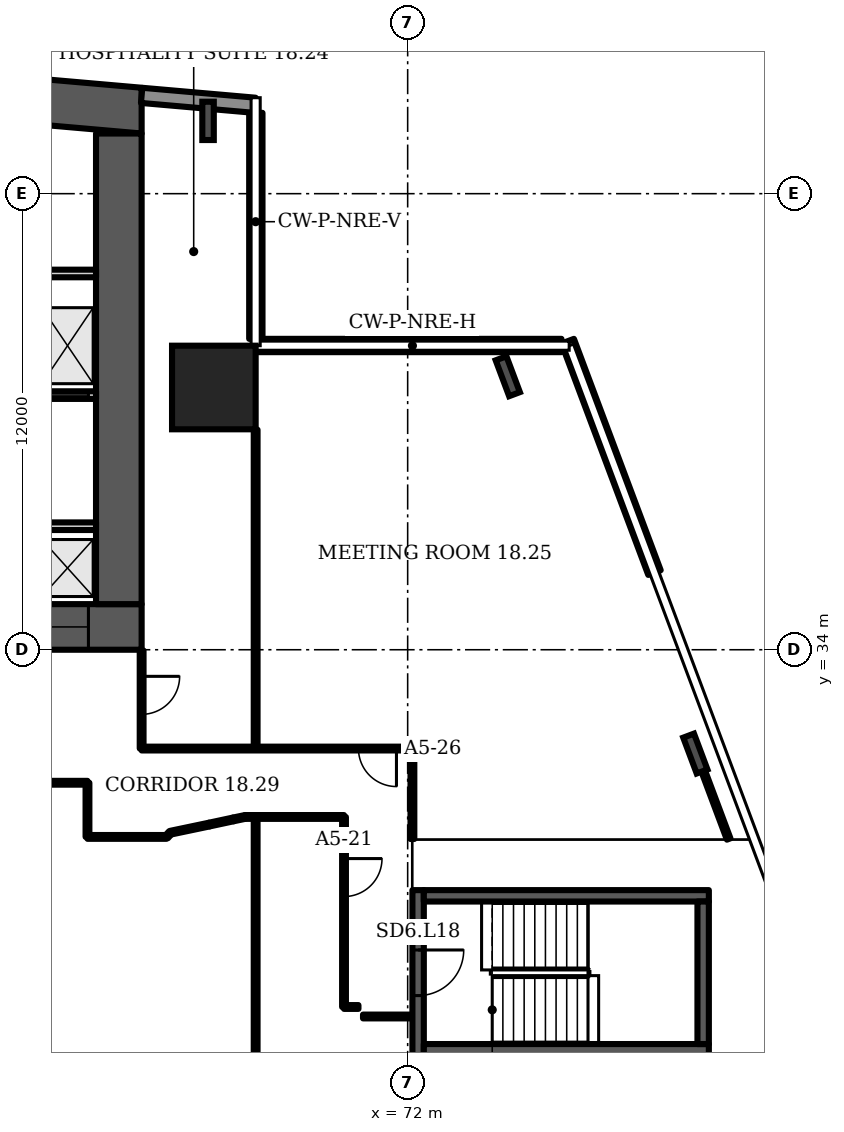
"""IFC4 building model, lengths in metres.
Left out: names, types, materials, properties, quantities, classifications, styles, units other than length and angle.
Written with IfcOpenShell. Run it as: python <this file> out.ifc"""

import sys

from ifc_helpers import new_model, si_unit, direction, frame, frame_2d, origin, origin_2d, place, context, subcontext, project, spatial, polyline, rectangle, i_section, outline, extrude, element, fill, save


model = new_model("IFC4")
c1 = context("Model", 3, precision=1e-05, world=origin(), true_north=direction((0.0, 1.0)))
c2 = subcontext(c1, "Body", "Model", "MODEL_VIEW")
j1 = project(units=[si_unit("LENGTHUNIT", "METRE"), si_unit("PLANEANGLEUNIT", "RADIAN")], contexts=[c1])
p1 = place(None, origin())
s1 = spatial("IfcSite", under=j1, at=p1, CompositionType="ELEMENT")
p2 = place(p1, origin())
s2 = spatial("IfcBuilding", under=s1, at=p2, CompositionType="ELEMENT")
p3 = place(p2, frame((0.0, 0.0, 84.7)))
s3 = spatial("IfcBuildingStorey", under=s2, at=p3, CompositionType="ELEMENT", Elevation=84.7)
p4 = place(p3, origin())
e1 = element("IfcWall", 1, at=p4, inside=s3, PredefinedType="SHEAR", context=c2, shape_type="SweptSolid", body=[
    extrude(outline(polyline([(9.0, 47.583), (37.0, 50.032), (65.0, 47.583), (65.0, 48.787), (37.0, 51.237), (9.0, 48.787), (9.0, 47.583)])), origin(), (0.0, 0.0, 1.0), 3.6),
])
p5 = place(p3, frame((9.0, 34.6, 0.0), z_axis=(0.0, 0.0, 1.0), x_axis=(1.0, 0.0, 0.0)))
e2 = element("IfcWall", 2, at=p5, inside=s3, PredefinedType="SHEAR", context=c2, shape_type="SweptSolid", body=[
    extrude(rectangle(XDim=56.0, YDim=1.2, at=frame_2d((28.0, 0.0))), origin(), (0.0, 0.0, 1.0), 3.6),
])
p6 = place(p5, frame((3.3, 0.0, 0.0)))
e3 = element("IfcOpeningElement", 3, at=p6, cuts=e2, PredefinedType="OPENING", context=c2, shape_type="SweptSolid", body=[
    extrude(rectangle(XDim=1.0, YDim=2.1, at=frame_2d((0.5, 1.05))), frame((0.0, 0.61, 0.0), z_axis=(0.0, -1.0, 0.0), x_axis=(1.0, 0.0, 0.0)), (0.0, 0.0, 1.0), 1.22),
])
p7 = place(p5, frame((7.867, 0.0, 0.0)))
e4 = element("IfcOpeningElement", 4, at=p7, cuts=e2, PredefinedType="OPENING", context=c2, shape_type="SweptSolid", body=[
    extrude(rectangle(XDim=1.1, YDim=2.1, at=frame_2d((0.55, 1.05))), frame((0.0, 0.61, 0.0), z_axis=(0.0, -1.0, 0.0), x_axis=(1.0, 0.0, 0.0)), (0.0, 0.0, 1.0), 1.22),
])
p8 = place(p5, frame((12.033, 0.0, 0.0)))
e5 = element("IfcOpeningElement", 5, at=p8, cuts=e2, PredefinedType="OPENING", context=c2, shape_type="SweptSolid", body=[
    extrude(rectangle(XDim=1.1, YDim=2.1, at=frame_2d((0.55, 1.05))), frame((0.0, 0.61, 0.0), z_axis=(0.0, -1.0, 0.0), x_axis=(1.0, 0.0, 0.0)), (0.0, 0.0, 1.0), 1.22),
])
p9 = place(p5, frame((9.8, 0.0, 0.0)))
e6 = element("IfcOpeningElement", 6, at=p9, cuts=e2, PredefinedType="OPENING", context=c2, shape_type="SweptSolid", body=[
    extrude(rectangle(XDim=1.4, YDim=2.1, at=frame_2d((0.7, 1.05))), frame((0.0, 0.61, 0.0), z_axis=(0.0, -1.0, 0.0), x_axis=(1.0, 0.0, 0.0)), (0.0, 0.0, 1.0), 1.22),
])
p10 = place(p5, frame((14.65, 0.0, 0.0)))
e7 = element("IfcOpeningElement", 7, at=p10, cuts=e2, PredefinedType="OPENING", context=c2, shape_type="SweptSolid", body=[
    extrude(rectangle(XDim=1.2, YDim=2.1, at=frame_2d((0.6, 1.05))), frame((0.0, 0.61, 0.0), z_axis=(0.0, -1.0, 0.0), x_axis=(1.0, 0.0, 0.0)), (0.0, 0.0, 1.0), 1.22),
])
p11 = place(p5, frame((21.867, 0.0, 0.0)))
e8 = element("IfcOpeningElement", 8, at=p11, cuts=e2, PredefinedType="OPENING", context=c2, shape_type="SweptSolid", body=[
    extrude(rectangle(XDim=1.1, YDim=2.1, at=frame_2d((0.55, 1.05))), frame((0.0, 0.61, 0.0), z_axis=(0.0, -1.0, 0.0), x_axis=(1.0, 0.0, 0.0)), (0.0, 0.0, 1.0), 1.22),
])
p12 = place(p5, frame((26.033, 0.0, 0.0)))
e9 = element("IfcOpeningElement", 9, at=p12, cuts=e2, PredefinedType="OPENING", context=c2, shape_type="SweptSolid", body=[
    extrude(rectangle(XDim=1.1, YDim=2.1, at=frame_2d((0.55, 1.05))), frame((0.0, 0.61, 0.0), z_axis=(0.0, -1.0, 0.0), x_axis=(1.0, 0.0, 0.0)), (0.0, 0.0, 1.0), 1.22),
])
p13 = place(p5, frame((23.8, 0.0, 0.0)))
e10 = element("IfcOpeningElement", 10, at=p13, cuts=e2, PredefinedType="OPENING", context=c2, shape_type="SweptSolid", body=[
    extrude(rectangle(XDim=1.4, YDim=2.1, at=frame_2d((0.7, 1.05))), frame((0.0, 0.61, 0.0), z_axis=(0.0, -1.0, 0.0), x_axis=(1.0, 0.0, 0.0)), (0.0, 0.0, 1.0), 1.22),
])
p14 = place(p5, frame((28.867, 0.0, 0.0)))
e11 = element("IfcOpeningElement", 11, at=p14, cuts=e2, PredefinedType="OPENING", context=c2, shape_type="SweptSolid", body=[
    extrude(rectangle(XDim=1.1, YDim=2.1, at=frame_2d((0.55, 1.05))), frame((0.0, 0.61, 0.0), z_axis=(0.0, -1.0, 0.0), x_axis=(1.0, 0.0, 0.0)), (0.0, 0.0, 1.0), 1.22),
])
p15 = place(p5, frame((33.033, 0.0, 0.0)))
e12 = element("IfcOpeningElement", 12, at=p15, cuts=e2, PredefinedType="OPENING", context=c2, shape_type="SweptSolid", body=[
    extrude(rectangle(XDim=1.1, YDim=2.1, at=frame_2d((0.55, 1.05))), frame((0.0, 0.61, 0.0), z_axis=(0.0, -1.0, 0.0), x_axis=(1.0, 0.0, 0.0)), (0.0, 0.0, 1.0), 1.22),
])
p16 = place(p5, frame((40.15, 0.0, 0.0)))
e13 = element("IfcOpeningElement", 13, at=p16, cuts=e2, PredefinedType="OPENING", context=c2, shape_type="SweptSolid", body=[
    extrude(rectangle(XDim=1.2, YDim=2.1, at=frame_2d((0.6, 1.05))), frame((0.0, 0.61, 0.0), z_axis=(0.0, -1.0, 0.0), x_axis=(1.0, 0.0, 0.0)), (0.0, 0.0, 1.0), 1.22),
])
p17 = place(p5, frame((44.8, 0.0, 0.0)))
e14 = element("IfcOpeningElement", 14, at=p17, cuts=e2, PredefinedType="OPENING", context=c2, shape_type="SweptSolid", body=[
    extrude(rectangle(XDim=1.4, YDim=2.1, at=frame_2d((0.7, 1.05))), frame((0.0, 0.61, 0.0), z_axis=(0.0, -1.0, 0.0), x_axis=(1.0, 0.0, 0.0)), (0.0, 0.0, 1.0), 1.22),
])
p18 = place(p5, frame((49.867, 0.0, 0.0)))
e15 = element("IfcOpeningElement", 15, at=p18, cuts=e2, PredefinedType="OPENING", context=c2, shape_type="SweptSolid", body=[
    extrude(rectangle(XDim=1.1, YDim=2.1, at=frame_2d((0.55, 1.05))), frame((0.0, 0.61, 0.0), z_axis=(0.0, -1.0, 0.0), x_axis=(1.0, 0.0, 0.0)), (0.0, 0.0, 1.0), 1.22),
])
p19 = place(p5, frame((53.5, 0.0, 0.0)))
e16 = element("IfcOpeningElement", 16, at=p19, cuts=e2, PredefinedType="OPENING", context=c2, shape_type="SweptSolid", body=[
    extrude(rectangle(XDim=1.1, YDim=2.1, at=frame_2d((0.55, 1.05))), frame((0.0, 0.61, 0.0), z_axis=(0.0, -1.0, 0.0), x_axis=(1.0, 0.0, 0.0)), (0.0, 0.0, 1.0), 1.22),
])
p20 = place(p5, frame((51.567, 0.0, 0.0)))
e17 = element("IfcOpeningElement", 17, at=p20, cuts=e2, PredefinedType="OPENING", context=c2, shape_type="SweptSolid", body=[
    extrude(rectangle(XDim=1.4, YDim=2.1, at=frame_2d((0.7, 1.05))), frame((0.0, 0.61, 0.0), z_axis=(0.0, -1.0, 0.0), x_axis=(1.0, 0.0, 0.0)), (0.0, 0.0, 1.0), 1.22),
])
p21 = place(p3, frame((64.4, 35.2, 0.0), z_axis=(0.0, 0.0, 1.0), x_axis=(0.0, 1.0, 0.0)))
e18 = element("IfcWall", 18, at=p21, inside=s3, PredefinedType="SHEAR", context=c2, shape_type="SweptSolid", body=[
    extrude(rectangle(XDim=12.383, YDim=1.2, at=frame_2d((6.191, 0.0))), origin(), (0.0, 0.0, 1.0), 3.6),
])
p22 = place(p3, frame((66.9, 40.9, 0.0), z_axis=(0.0, 0.0, 1.0), x_axis=(1.0, 0.0, 0.0)))
e19 = element("IfcColumn", 19, at=p22, inside=s3, PredefinedType="COLUMN", context=c2, shape_type="SweptSolid", body=[
    extrude(rectangle(XDim=2.2, YDim=2.2, at=origin_2d()), origin(), (0.0, 0.0, 1.0), 3.6),
])
for number, where, z_axis, x_axis in (
    (20, (79.57, 31.268, 0.0), (0.0, 0.0, 1.0), (0.936, 0.351, 0.0)),
    (21, (74.634, 41.196, 0.0), (0.0, 0.0, 1.0), (0.936, 0.351, 0.0)),
    (22, (66.748, 47.915, 0.0), (0.0, 0.0, 1.0), (1.0, 0.0, 0.0)),
):
    element("IfcColumn", number, at=place(p3, frame(where, z_axis=z_axis, x_axis=x_axis)), inside=s3, PredefinedType="COLUMN", context=c2, shape_type="SweptSolid", body=[
        extrude(i_section(OverallWidth=0.302, OverallDepth=1.008, WebThickness=0.021, FlangeThickness=0.04, FilletRadius=0.03, at=origin_2d()), origin(), (0.0, 0.0, 1.0), 3.6),
    ])
p23 = place(p3, frame((67.983, 48.326, 0.0), z_axis=(0.0, 0.0, 1.0), x_axis=(-0.996194, 0.087168, 0.0)))
e23 = element("IfcWall", 23, at=p23, inside=s3, PredefinedType="SOLIDWALL", context=c2, shape_type="SweptSolid", body=[
    extrude(rectangle(XDim=2.994, YDim=0.4, at=frame_2d((1.497, 0.0))), origin(), (0.0, 0.0, 1.0), 3.2),
])
p24 = place(p3, frame((78.494, 36.03, 0.0), z_axis=(0.0, 0.0, 1.0), x_axis=(-0.351108, 0.936338, 0.0)))
e24 = element("IfcWall", 24, at=p24, inside=s3, PredefinedType="SOLIDWALL", context=c2, shape_type="SweptSolid", body=[
    extrude(rectangle(XDim=6.503, YDim=0.35, at=frame_2d((3.251, 0.0))), origin(), (0.0, 0.0, 1.0), 1.0),
])
p25 = place(p3, frame((76.047, 42.005, 0.0), z_axis=(0.0, 0.0, 1.0), x_axis=(-1.0, 0.0, 0.0)))
e25 = element("IfcWall", 25, at=p25, inside=s3, PredefinedType="SOLIDWALL", context=c2, shape_type="SweptSolid", body=[
    extrude(rectangle(XDim=8.047, YDim=0.35, at=frame_2d((4.023, 0.0))), origin(), (0.0, 0.0, 1.0), 1.0),
])
p26 = place(p3, frame((68.005, 42.18, 0.0), z_axis=(0.0, 0.0, 1.0), x_axis=(0.0, 1.0, 0.0)))
e26 = element("IfcWall", 26, at=p26, inside=s3, PredefinedType="SOLIDWALL", context=c2, shape_type="SweptSolid", body=[
    extrude(rectangle(XDim=5.947, YDim=0.35, at=frame_2d((2.973, 0.0))), origin(), (0.0, 0.0, 1.0), 1.0),
])
p27 = place(p3, frame((58.6, 40.7, 0.0), z_axis=(0.0, 0.0, 1.0), x_axis=(1.0, 0.0, 0.0)))
e27 = element("IfcWall", 27, at=p27, inside=s3, PredefinedType="PARTITIONING", context=c2, shape_type="SweptSolid", body=[
    extrude(rectangle(XDim=5.2, YDim=0.2, at=frame_2d((2.6, 0.0))), origin(), (0.0, 0.0, 1.0), 3.2),
])
p28 = place(p27, frame((0.267, 0.0, 0.0)))
e28 = element("IfcOpeningElement", 28, at=p28, cuts=e27, PredefinedType="OPENING", context=c2, shape_type="SweptSolid", body=[
    extrude(rectangle(XDim=1.1, YDim=2.1, at=frame_2d((0.55, 1.05))), frame((0.0, 0.11, 0.0), z_axis=(0.0, -1.0, 0.0), x_axis=(1.0, 0.0, 0.0)), (0.0, 0.0, 1.0), 0.22),
])
p29 = place(p27, frame((2.117, 0.0, 0.0)))
e29 = element("IfcOpeningElement", 29, at=p29, cuts=e27, PredefinedType="OPENING", context=c2, shape_type="SweptSolid", body=[
    extrude(rectangle(XDim=1.1, YDim=2.1, at=frame_2d((0.55, 1.05))), frame((0.0, 0.11, 0.0), z_axis=(0.0, -1.0, 0.0), x_axis=(1.0, 0.0, 0.0)), (0.0, 0.0, 1.0), 0.22),
])
p30 = place(p27, frame((3.9, 0.0, 0.0)))
e30 = element("IfcOpeningElement", 30, at=p30, cuts=e27, PredefinedType="OPENING", context=c2, shape_type="SweptSolid", body=[
    extrude(rectangle(XDim=1.1, YDim=2.1, at=frame_2d((0.55, 1.05))), frame((0.0, 0.11, 0.0), z_axis=(0.0, -1.0, 0.0), x_axis=(1.0, 0.0, 0.0)), (0.0, 0.0, 1.0), 0.22),
])
p31 = place(p3, frame((0.0, 0.0, -0.0)))
e31 = element("IfcWall", 31, at=p31, inside=s3, PredefinedType="PARTITIONING", context=c2, shape_type="SweptSolid", body=[
    extrude(outline(polyline([(62.1, 37.35), (62.3, 37.35), (63.8, 37.35), (63.8, 37.15), (62.3, 37.15), (62.3, 35.2), (62.1, 35.2), (62.1, 37.35)])), origin(), (0.0, 0.0, 1.0), 3.2),
])
p32 = place(p3, frame((0.0, 0.0, -0.0)))
e32 = element("IfcWall", 32, at=p32, inside=s3, PredefinedType="PARTITIONING", context=c2, shape_type="SweptSolid", body=[
    extrude(outline(polyline([(60.433, 40.8), (60.233, 40.8), (60.233, 43.8), (58.6, 43.8), (58.6, 44.0), (63.8, 44.0), (63.8, 43.8), (62.3, 43.8), (62.3, 40.8), (62.1, 40.8), (62.1, 43.8), (60.433, 43.8), (60.433, 40.8)])), origin(), (0.0, 0.0, 1.0), 3.2),
])
p33 = place(p3, frame((72.275, 23.325, 0.0), z_axis=(0.0, 0.0, 1.0), x_axis=(0.0, 1.0, 0.0)))
e33 = element("IfcWall", 33, at=p33, inside=s3, PredefinedType="SHEAR", context=c2, shape_type="SweptSolid", body=[
    extrude(rectangle(XDim=4.35, YDim=0.3, at=frame_2d((2.175, 0.0))), origin(), (0.0, 0.0, 1.0), 3.2),
])
p34 = place(p33, frame((1.575, 0.0, 0.0)))
e34 = element("IfcOpeningElement", 34, at=p34, cuts=e33, PredefinedType="OPENING", context=c2, shape_type="SweptSolid", body=[
    extrude(rectangle(XDim=1.2, YDim=2.1, at=frame_2d((0.6, 1.05))), frame((0.0, 0.16, 0.0), z_axis=(0.0, -1.0, 0.0), x_axis=(1.0, 0.0, 0.0)), (0.0, 0.0, 1.0), 0.32),
])
p35 = place(p3, frame((45.3, 30.5, 0.0), z_axis=(0.0, 0.0, 1.0), x_axis=(1.0, 0.0, 0.0)))
e35 = element("IfcWall", 35, at=p35, inside=s3, PredefinedType="PARTITIONING", context=c2, shape_type="SweptSolid", body=[
    extrude(rectangle(XDim=18.275, YDim=0.1, at=frame_2d((9.137, 0.0))), origin(), (0.0, 0.0, 1.0), 3.2),
])
p36 = place(p3, frame((63.575, 29.075, 0.0), z_axis=(0.0, 0.0, 1.0), x_axis=(0.0, 1.0, 0.0)))
e36 = element("IfcWall", 36, at=p36, inside=s3, PredefinedType="PARTITIONING", context=c2, shape_type="SweptSolid", body=[
    extrude(rectangle(XDim=1.425, YDim=0.1, at=frame_2d((0.712, 0.0))), origin(), (0.0, 0.0, 1.0), 3.2),
])
p37 = place(p3, frame((63.575, 29.075, 0.0), z_axis=(0.0, 0.0, 1.0), x_axis=(1.0, 0.0, 0.0)))
e37 = element("IfcWall", 37, at=p37, inside=s3, PredefinedType="PARTITIONING", context=c2, shape_type="SweptSolid", body=[
    extrude(rectangle(XDim=2.08, YDim=0.1, at=frame_2d((1.04, 0.0))), origin(), (0.0, 0.0, 1.0), 3.2),
])
p38 = place(p3, frame((65.0, 31.4, 0.0), z_axis=(0.0, 0.0, 1.0), x_axis=(0.0, 1.0, 0.0)))
e38 = element("IfcWall", 38, at=p38, inside=s3, PredefinedType="PARTITIONING", context=c2, shape_type="SweptSolid", body=[
    extrude(rectangle(XDim=2.58, YDim=0.1, at=frame_2d((1.29, 0.0))), origin(), (0.0, 0.0, 1.0), 3.2),
])
p39 = place(p38, frame((0.9, 0.0, 0.0)))
e39 = element("IfcOpeningElement", 39, at=p39, cuts=e38, PredefinedType="OPENING", context=c2, shape_type="SweptSolid", body=[
    extrude(rectangle(XDim=1.0, YDim=2.1, at=frame_2d((0.5, 1.05))), frame((0.0, 0.06, 0.0), z_axis=(0.0, -1.0, 0.0), x_axis=(1.0, 0.0, 0.0)), (0.0, 0.0, 1.0), 0.12),
])
p40 = place(p3, frame((65.0, 31.4, 0.0), z_axis=(0.0, 0.0, 1.0), x_axis=(1.0, 0.0, 0.0)))
e40 = element("IfcWall", 40, at=p40, inside=s3, PredefinedType="PARTITIONING", context=c2, shape_type="SweptSolid", body=[
    extrude(rectangle(XDim=7.125, YDim=0.1, at=frame_2d((3.562, 0.0))), origin(), (0.0, 0.0, 1.0), 3.2),
])
p41 = place(p40, frame((5.705, 0.0, 0.0)))
e41 = element("IfcOpeningElement", 41, at=p41, cuts=e40, PredefinedType="OPENING", context=c2, shape_type="SweptSolid", body=[
    extrude(rectangle(XDim=1.0, YDim=2.1, at=frame_2d((0.5, 1.05))), frame((0.0, 0.06, 0.0), z_axis=(0.0, -1.0, 0.0), x_axis=(1.0, 0.0, 0.0)), (0.0, 0.0, 1.0), 0.12),
])
p42 = place(p3, frame((65.655, 29.075, 0.0), z_axis=(0.0, 0.0, 1.0), x_axis=(0.671773, 0.740757, 0.0)))
e42 = element("IfcWall", 42, at=p42, inside=s3, PredefinedType="PARTITIONING", context=c2, shape_type="SweptSolid", body=[
    extrude(rectangle(XDim=0.149, YDim=0.1, at=frame_2d((0.074, 0.0))), origin(), (0.0, 0.0, 1.0), 3.2),
])
p43 = place(p3, frame((65.755, 29.185, 0.0), z_axis=(0.0, 0.0, 1.0), x_axis=(0.978739, 0.205118, 0.0)))
e43 = element("IfcWall", 43, at=p43, inside=s3, PredefinedType="PARTITIONING", context=c2, shape_type="SweptSolid", body=[
    extrude(rectangle(XDim=1.047, YDim=0.1, at=frame_2d((0.524, 0.0))), origin(), (0.0, 0.0, 1.0), 3.2),
])
p44 = place(p3, frame((66.78, 29.4, 0.0), z_axis=(0.0, 0.0, 1.0), x_axis=(0.977792, 0.209581, 0.0)))
e44 = element("IfcWall", 44, at=p44, inside=s3, PredefinedType="PARTITIONING", context=c2, shape_type="SweptSolid", body=[
    extrude(rectangle(XDim=0.644, YDim=0.1, at=frame_2d((0.322, 0.0))), origin(), (0.0, 0.0, 1.0), 3.2),
])
p45 = place(p3, frame((67.41, 29.535, 0.0), z_axis=(0.0, 0.0, 1.0), x_axis=(0.978604, 0.205738, 0.0)))
e45 = element("IfcWall", 45, at=p45, inside=s3, PredefinedType="PARTITIONING", context=c2, shape_type="SweptSolid", body=[
    extrude(rectangle(XDim=0.317, YDim=0.1, at=frame_2d((0.158, 0.0))), origin(), (0.0, 0.0, 1.0), 3.2),
])
p46 = place(p3, frame((67.72, 29.6, 0.0), z_axis=(0.0, 0.0, 1.0), x_axis=(1.0, 0.0, 0.0)))
e46 = element("IfcWall", 46, at=p46, inside=s3, PredefinedType="PARTITIONING", context=c2, shape_type="SweptSolid", body=[
    extrude(rectangle(XDim=2.605, YDim=0.1, at=frame_2d((1.302, 0.0))), origin(), (0.0, 0.0, 1.0), 3.2),
])
p47 = place(p3, frame((68.0, 14.93, 0.0), z_axis=(0.0, 0.0, 1.0), x_axis=(0.0, 1.0, 0.0)))
e47 = element("IfcWall", 47, at=p47, inside=s3, PredefinedType="PARTITIONING", context=c2, shape_type="SweptSolid", body=[
    extrude(rectangle(XDim=14.67, YDim=0.1, at=frame_2d((7.335, 0.0))), origin(), (0.0, 0.0, 1.0), 3.2),
])
p48 = place(p3, frame((68.0, 31.4, 0.0), z_axis=(0.0, 0.0, 1.0), x_axis=(0.0, 1.0, 0.0)))
e48 = element("IfcWall", 48, at=p48, inside=s3, PredefinedType="PARTITIONING", context=c2, shape_type="SweptSolid", body=[
    extrude(rectangle(XDim=8.39, YDim=0.1, at=frame_2d((4.195, 0.0))), origin(), (0.0, 0.0, 1.0), 3.2),
])
p49 = place(p3, frame((70.325, 24.6, 0.0), z_axis=(0.0, 0.0, 1.0), x_axis=(0.0, 1.0, 0.0)))
e49 = element("IfcWall", 49, at=p49, inside=s3, PredefinedType="PARTITIONING", context=c2, shape_type="SweptSolid", body=[
    extrude(rectangle(XDim=5.0, YDim=0.1, at=frame_2d((2.5, 0.0))), origin(), (0.0, 0.0, 1.0), 3.2),
])
p50 = place(p49, frame((2.905, 0.0, 0.0)))
e50 = element("IfcOpeningElement", 50, at=p50, cuts=e49, PredefinedType="OPENING", context=c2, shape_type="SweptSolid", body=[
    extrude(rectangle(XDim=1.0, YDim=2.1, at=frame_2d((0.5, 1.05))), frame((0.0, 0.06, 0.0), z_axis=(0.0, -1.0, 0.0), x_axis=(1.0, 0.0, 0.0)), (0.0, 0.0, 1.0), 0.12),
])
p51 = place(p3, frame((70.325, 24.6, 0.0), z_axis=(0.0, 0.0, 1.0), x_axis=(1.0, 0.0, 0.0)))
e51 = element("IfcWall", 51, at=p51, inside=s3, PredefinedType="PARTITIONING", context=c2, shape_type="SweptSolid", body=[
    extrude(rectangle(XDim=0.38, YDim=0.1, at=frame_2d((0.19, 0.0))), origin(), (0.0, 0.0, 1.0), 3.2),
])
p52 = place(p3, frame((70.825, 24.35, 0.0), z_axis=(0.0, 0.0, 1.0), x_axis=(1.0, 0.0, 0.0)))
e52 = element("IfcWall", 52, at=p52, inside=s3, PredefinedType="PARTITIONING", context=c2, shape_type="SweptSolid", body=[
    extrude(rectangle(XDim=1.28, YDim=0.1, at=frame_2d((0.64, 0.0))), origin(), (0.0, 0.0, 1.0), 3.2),
])
p53 = place(p3, frame((72.125, 29.02, 0.0), z_axis=(0.0, 0.0, 1.0), x_axis=(0.0, 1.0, 0.0)))
e53 = element("IfcWall", 53, at=p53, inside=s3, PredefinedType="PARTITIONING", context=c2, shape_type="SweptSolid", body=[
    extrude(rectangle(XDim=2.38, YDim=0.1, at=frame_2d((1.19, 0.0))), origin(), (0.0, 0.0, 1.0), 3.2),
])
p54 = place(p3, frame((80.446, 29.02, 0.0), z_axis=(0.0, 0.0, 1.0), x_axis=(-0.350707, 0.936481, 0.0)))
e54 = element("IfcWall", 54, at=p54, inside=s3, PredefinedType="PARTITIONING", context=c2, shape_type="SweptSolid", body=[
    extrude(rectangle(XDim=2.901, YDim=0.1, at=frame_2d((1.45, 0.0))), origin(), (0.0, 0.0, 1.0), 2.58),
])
for number, where, z_axis, x_axis in (
    (55, (72.425, 23.475, 0.0), (0.0, 0.0, 1.0), (1.0, 0.0, 0.0)),
    (56, (72.425, 27.525, 0.0), (0.0, 0.0, 1.0), (1.0, 0.0, 0.0)),
):
    element("IfcWall", number, at=place(p3, frame(where, z_axis=z_axis, x_axis=x_axis)), inside=s3, PredefinedType="SHEAR", context=c2, shape_type="SweptSolid", body=[
        extrude(rectangle(XDim=7.5, YDim=0.3, at=frame_2d((3.75, 0.0))), origin(), (0.0, 0.0, 1.0), 3.2),
    ])
p55 = place(p3, frame((79.775, 23.625, 0.0), z_axis=(0.0, 0.0, 1.0), x_axis=(0.0, 1.0, 0.0)))
e57 = element("IfcWall", 57, at=p55, inside=s3, PredefinedType="SHEAR", context=c2, shape_type="SweptSolid", body=[
    extrude(rectangle(XDim=3.75, YDim=0.3, at=frame_2d((1.875, 0.0))), origin(), (0.0, 0.0, 1.0), 3.2),
])
p56 = place(p19, origin())
e58 = element("IfcDoor", 58, at=p56, inside=s3, OperationType="DOUBLE_DOOR_SLIDING", PredefinedType="DOOR", context=c2, shape_type="SweptSolid", body=[
    extrude(rectangle(XDim=1.1, YDim=2.1, at=frame_2d((0.55, 1.05))), frame((0.0, 0.025, 0.0), z_axis=(0.0, -1.0, 0.0), x_axis=(1.0, 0.0, 0.0)), (0.0, 0.0, 1.0), 0.05),
])
fill(e16, e58)
p57 = place(p30, origin())
e59 = element("IfcDoor", 59, at=p57, inside=s3, OperationType="DOUBLE_DOOR_SLIDING", PredefinedType="DOOR", context=c2, shape_type="SweptSolid", body=[
    extrude(rectangle(XDim=1.1, YDim=2.1, at=frame_2d((0.55, 1.05))), frame((0.0, 0.025, 0.0), z_axis=(0.0, -1.0, 0.0), x_axis=(1.0, 0.0, 0.0)), (0.0, 0.0, 1.0), 0.05),
])
fill(e30, e59)
p58 = place(p34, origin())
e60 = element("IfcDoor", 60, at=p58, inside=s3, OperationType="SINGLE_SWING_RIGHT", PredefinedType="DOOR", context=c2, shape_type="SweptSolid", body=[
    extrude(rectangle(XDim=1.2, YDim=2.1, at=frame_2d((0.6, 1.05))), frame((0.0, 0.025, 0.0), z_axis=(0.0, -1.0, 0.0), x_axis=(1.0, 0.0, 0.0)), (0.0, 0.0, 1.0), 0.05),
])
fill(e34, e60)
p59 = place(p50, origin())
e61 = element("IfcDoor", 61, at=p59, inside=s3, OperationType="SINGLE_SWING_RIGHT", PredefinedType="DOOR", context=c2, shape_type="SweptSolid", body=[
    extrude(rectangle(XDim=1.0, YDim=2.1, at=frame_2d((0.5, 1.05))), frame((0.0, 0.025, 0.0), z_axis=(0.0, -1.0, 0.0), x_axis=(1.0, 0.0, 0.0)), (0.0, 0.0, 1.0), 0.05),
])
fill(e50, e61)
p60 = place(p41, origin())
e62 = element("IfcDoor", 62, at=p60, inside=s3, OperationType="SINGLE_SWING_RIGHT", PredefinedType="DOOR", context=c2, shape_type="SweptSolid", body=[
    extrude(rectangle(XDim=1.0, YDim=2.1, at=frame_2d((0.5, 1.05))), frame((0.0, 0.025, 0.0), z_axis=(0.0, -1.0, 0.0), x_axis=(1.0, 0.0, 0.0)), (0.0, 0.0, 1.0), 0.05),
])
fill(e41, e62)
p61 = place(p39, origin())
e63 = element("IfcDoor", 63, at=p61, inside=s3, OperationType="SINGLE_SWING_RIGHT", PredefinedType="DOOR", context=c2, shape_type="SweptSolid", body=[
    extrude(rectangle(XDim=1.0, YDim=2.1, at=frame_2d((0.5, 1.05))), frame((0.0, 0.025, 0.0), z_axis=(0.0, -1.0, 0.0), x_axis=(1.0, 0.0, 0.0)), (0.0, 0.0, 1.0), 0.05),
])
fill(e39, e63)
save(model, sys.argv[1])
